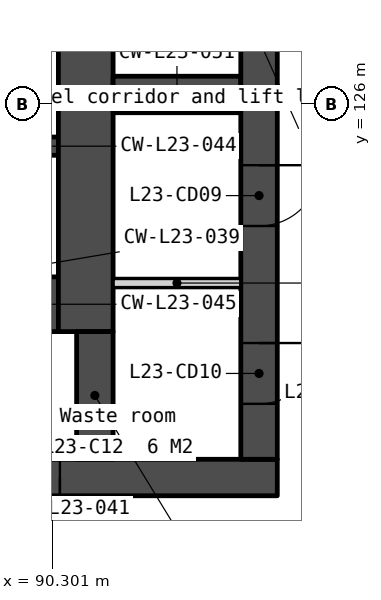
"""IFC4 building model, lengths in metres.
Left out: names, types, materials, properties, quantities, classifications, styles, units other than length and angle.
Written with IfcOpenShell. Run it as: python <this file> out.ifc"""

import sys

from ifc_helpers import new_model, si_unit, direction, frame, frame_2d, origin, place, context, subcontext, project, spatial, polyline, rectangle, outline, extrude, element, fill, save


model = new_model("IFC4")
c1 = context("Model", 3, precision=1e-05, world=origin(), true_north=direction((0.0, 1.0)))
c2 = subcontext(c1, "Body", "Model", "MODEL_VIEW")
j1 = project(units=[si_unit("LENGTHUNIT", "METRE"), si_unit("PLANEANGLEUNIT", "RADIAN")], contexts=[c1])
p1 = place(None, origin())
s1 = spatial("IfcSite", under=j1, at=p1, CompositionType="ELEMENT")
p2 = place(p1, origin())
s2 = spatial("IfcBuilding", under=s1, at=p2, CompositionType="ELEMENT")
p3 = place(p2, frame((0.0, 0.0, 95.8)))
s3 = spatial("IfcBuildingStorey", under=s2, at=p3, CompositionType="ELEMENT", Elevation=95.8)
p4 = place(p3, frame((66.0, 119.85, 0.0), z_axis=(0.0, 0.0, 1.0), x_axis=(1.0, 0.0, 0.0)))
e1 = element("IfcWall", 1, at=p4, inside=s3, PredefinedType="SOLIDWALL", context=c2, shape_type="SweptSolid", body=[
    extrude(rectangle(XDim=28.0, YDim=0.6, at=frame_2d((14.0, 0.0))), origin(), (0.0, 0.0, 1.0), 3.35),
])
p5 = place(p4, frame((6.825, 0.0, 0.0)))
e2 = element("IfcOpeningElement", 2, at=p5, cuts=e1, PredefinedType="OPENING", context=c2, shape_type="SweptSolid", body=[
    extrude(rectangle(XDim=1.8, YDim=2.1, at=frame_2d((0.9, 1.05))), frame((0.0, 0.31, 0.0), z_axis=(0.0, -1.0, 0.0), x_axis=(1.0, 0.0, 0.0)), (0.0, 0.0, 1.0), 0.62),
])
p6 = place(p4, frame((15.85, 0.0, 0.0)))
e3 = element("IfcOpeningElement", 3, at=p6, cuts=e1, PredefinedType="OPENING", context=c2, shape_type="SweptSolid", body=[
    extrude(rectangle(XDim=1.5, YDim=2.1, at=frame_2d((0.75, 1.05))), frame((0.0, 0.31, 0.0), z_axis=(0.0, -1.0, 0.0), x_axis=(1.0, 0.0, 0.0)), (0.0, 0.0, 1.0), 0.62),
])
p7 = place(p4, frame((19.375, 0.0, 0.0)))
e4 = element("IfcOpeningElement", 4, at=p7, cuts=e1, PredefinedType="OPENING", context=c2, shape_type="SweptSolid", body=[
    extrude(rectangle(XDim=1.8, YDim=2.1, at=frame_2d((0.9, 1.05))), frame((0.0, 0.31, 0.0), z_axis=(0.0, -1.0, 0.0), x_axis=(1.0, 0.0, 0.0)), (0.0, 0.0, 1.0), 0.62),
])
p8 = place(p4, frame((4.425, 0.0, 0.0)))
e5 = element("IfcOpeningElement", 5, at=p8, cuts=e1, PredefinedType="OPENING", context=c2, shape_type="SweptSolid", body=[
    extrude(rectangle(XDim=1.0, YDim=2.1, at=frame_2d((0.5, 1.05))), frame((0.0, 0.31, 0.0), z_axis=(0.0, -1.0, 0.0), x_axis=(1.0, 0.0, 0.0)), (0.0, 0.0, 1.0), 0.62),
])
p9 = place(p4, frame((9.925, 0.0, 0.0)))
e6 = element("IfcOpeningElement", 6, at=p9, cuts=e1, PredefinedType="OPENING", context=c2, shape_type="SweptSolid", body=[
    extrude(rectangle(XDim=1.0, YDim=2.1, at=frame_2d((0.5, 1.05))), frame((0.0, 0.31, 0.0), z_axis=(0.0, -1.0, 0.0), x_axis=(1.0, 0.0, 0.0)), (0.0, 0.0, 1.0), 0.62),
])
p10 = place(p4, frame((13.125, 0.0, 0.0)))
e7 = element("IfcOpeningElement", 7, at=p10, cuts=e1, PredefinedType="OPENING", context=c2, shape_type="SweptSolid", body=[
    extrude(rectangle(XDim=1.0, YDim=2.1, at=frame_2d((0.5, 1.05))), frame((0.0, 0.31, 0.0), z_axis=(0.0, -1.0, 0.0), x_axis=(1.0, 0.0, 0.0)), (0.0, 0.0, 1.0), 0.62),
])
p11 = place(p4, frame((21.725, 0.0, 0.0)))
e8 = element("IfcOpeningElement", 8, at=p11, cuts=e1, PredefinedType="OPENING", context=c2, shape_type="SweptSolid", body=[
    extrude(rectangle(XDim=1.0, YDim=2.1, at=frame_2d((0.5, 1.05))), frame((0.0, 0.31, 0.0), z_axis=(0.0, -1.0, 0.0), x_axis=(1.0, 0.0, 0.0)), (0.0, 0.0, 1.0), 0.62),
])
p12 = place(p4, frame((23.425, 0.0, 0.0)))
e9 = element("IfcOpeningElement", 9, at=p12, cuts=e1, PredefinedType="OPENING", context=c2, shape_type="SweptSolid", body=[
    extrude(rectangle(XDim=1.0, YDim=2.1, at=frame_2d((0.5, 1.05))), frame((0.0, 0.31, 0.0), z_axis=(0.0, -1.0, 0.0), x_axis=(1.0, 0.0, 0.0)), (0.0, 0.0, 1.0), 0.62),
])
p13 = place(p3, frame((87.85, 125.3, 0.0), z_axis=(0.0, 0.0, 1.0), x_axis=(1.0, 0.0, 0.0)))
e10 = element("IfcWall", 10, at=p13, inside=s3, PredefinedType="SOLIDWALL", context=c2, shape_type="SweptSolid", body=[
    extrude(rectangle(XDim=2.55, YDim=0.3, at=frame_2d((1.275, 0.0))), origin(), (0.0, 0.0, 1.0), 3.35),
])
p14 = place(p3, frame((87.85, 122.7, 0.0), z_axis=(0.0, 0.0, 1.0), x_axis=(1.0, 0.0, 0.0)))
e11 = element("IfcWall", 11, at=p14, inside=s3, PredefinedType="SOLIDWALL", context=c2, shape_type="SweptSolid", body=[
    extrude(rectangle(XDim=2.55, YDim=0.9, at=frame_2d((1.275, 0.0))), origin(), (0.0, 0.0, 1.0), 3.35),
])
p15 = place(p3, frame((90.85, 133.95, 0.0), z_axis=(0.0, 0.0, 1.0), x_axis=(0.0, -1.0, 0.0)))
e12 = element("IfcWall", 12, at=p15, inside=s3, PredefinedType="SOLIDWALL", context=c2, shape_type="SweptSolid", body=[
    extrude(rectangle(XDim=11.7, YDim=0.9, at=frame_2d((5.85, 0.0))), origin(), (0.0, 0.0, 1.0), 3.35),
])
p16 = place(p3, frame((91.0, 122.25, 0.0), z_axis=(0.0, 0.0, 1.0), x_axis=(0.0, -1.0, 0.0)))
e13 = element("IfcWall", 13, at=p16, inside=s3, PredefinedType="SOLIDWALL", context=c2, shape_type="SweptSolid", body=[
    extrude(rectangle(XDim=2.1, YDim=0.6, at=frame_2d((1.05, 0.0))), origin(), (0.0, 0.0, 1.0), 3.35),
])
p17 = place(p3, frame((91.3, 126.15, 0.0), z_axis=(0.0, 0.0, 1.0), x_axis=(1.0, 0.0, 0.0)))
e14 = element("IfcWall", 14, at=p17, inside=s3, PredefinedType="SOLIDWALL", context=c2, shape_type="SweptSolid", body=[
    extrude(rectangle(XDim=2.1, YDim=0.6, at=frame_2d((1.05, 0.0))), origin(), (0.0, 0.0, 1.0), 3.35),
])
p18 = place(p3, frame((91.3, 123.049, 0.0), z_axis=(0.0, 0.0, 1.0), x_axis=(1.0, 0.0, 0.0)))
e15 = element("IfcWall", 15, at=p18, inside=s3, PredefinedType="PARTITIONING", context=c2, shape_type="SweptSolid", body=[
    extrude(rectangle(XDim=2.1, YDim=0.15, at=frame_2d((1.05, 0.0))), origin(), (0.0, 0.0, 1.0), 3.35),
])
p19 = place(p3, frame((93.7, 133.95, 0.0), z_axis=(0.0, 0.0, 1.0), x_axis=(0.0, -1.0, 0.0)))
e16 = element("IfcWall", 16, at=p19, inside=s3, PredefinedType="SOLIDWALL", context=c2, shape_type="SweptSolid", body=[
    extrude(rectangle(XDim=13.8, YDim=0.6, at=frame_2d((6.9, 0.0))), origin(), (0.0, 0.0, 1.0), 3.35),
])
p20 = place(p19, frame((0.6, 0.0, 0.0)))
e17 = element("IfcOpeningElement", 17, at=p20, cuts=e16, PredefinedType="OPENING", context=c2, shape_type="SweptSolid", body=[
    extrude(rectangle(XDim=1.1, YDim=2.1, at=frame_2d((0.55, 1.05))), frame((0.0, 0.31, 0.0), z_axis=(0.0, -1.0, 0.0), x_axis=(1.0, 0.0, 0.0)), (0.0, 0.0, 1.0), 0.62),
])
p21 = place(p19, frame((8.963, 0.0, 0.0)))
e18 = element("IfcOpeningElement", 18, at=p21, cuts=e16, PredefinedType="OPENING", context=c2, shape_type="SweptSolid", body=[
    extrude(rectangle(XDim=1.0, YDim=2.1, at=frame_2d((0.5, 1.05))), frame((0.0, 0.31, 0.0), z_axis=(0.0, -1.0, 0.0), x_axis=(1.0, 0.0, 0.0)), (0.0, 0.0, 1.0), 0.62),
])
p22 = place(p19, frame((11.888, 0.0, 0.0)))
e19 = element("IfcOpeningElement", 19, at=p22, cuts=e16, PredefinedType="OPENING", context=c2, shape_type="SweptSolid", body=[
    extrude(rectangle(XDim=1.0, YDim=2.1, at=frame_2d((0.5, 1.05))), frame((0.0, 0.31, 0.0), z_axis=(0.0, -1.0, 0.0), x_axis=(1.0, 0.0, 0.0)), (0.0, 0.0, 1.0), 0.62),
])
p23 = place(p3, frame((82.605, 93.333, -0.15), z_axis=(0.0, 0.0, 1.0), x_axis=(0.500000478905, 0.866025127289, 0.0)))
e20 = element("IfcWall", 20, at=p23, inside=s3, PredefinedType="SOLIDWALL", context=c2, shape_type="SweptSolid", body=[
    extrude(outline(polyline([(42.643, 0.0), (42.643, 3.5), (0.0, 3.5), (0.0, 0.0), (42.643, 0.0)])), frame((0.0, 0.225, 0.0), z_axis=(0.0, -1.0, 0.0), x_axis=(1.0, 0.0, 0.0)), (0.0, 0.0, 1.0), 0.45),
])
p24 = place(p23, frame((2.814, 0.0, 1.05)))
e21 = element("IfcOpeningElement", 21, at=p24, cuts=e20, PredefinedType="OPENING", context=c2, shape_type="SweptSolid", body=[
    extrude(rectangle(XDim=1.2, YDim=1.5, at=frame_2d((0.6, 0.75))), frame((0.0, 0.235, 0.0), z_axis=(0.0, -1.0, 0.0), x_axis=(1.0, 0.0, 0.0)), (0.0, 0.0, 1.0), 0.47),
])
p25 = place(p23, frame((4.514, 0.0, 1.05)))
e22 = element("IfcOpeningElement", 22, at=p25, cuts=e20, PredefinedType="OPENING", context=c2, shape_type="SweptSolid", body=[
    extrude(rectangle(XDim=1.2, YDim=1.5, at=frame_2d((0.6, 0.75))), frame((0.0, 0.235, 0.0), z_axis=(0.0, -1.0, 0.0), x_axis=(1.0, 0.0, 0.0)), (0.0, 0.0, 1.0), 0.47),
])
p26 = place(p23, frame((11.343, 0.0, 1.05)))
e23 = element("IfcOpeningElement", 23, at=p26, cuts=e20, PredefinedType="OPENING", context=c2, shape_type="SweptSolid", body=[
    extrude(rectangle(XDim=1.2, YDim=1.5, at=frame_2d((0.6, 0.75))), frame((0.0, 0.235, 0.0), z_axis=(0.0, -1.0, 0.0), x_axis=(1.0, 0.0, 0.0)), (0.0, 0.0, 1.0), 0.47),
])
p27 = place(p23, frame((13.043, 0.0, 1.05)))
e24 = element("IfcOpeningElement", 24, at=p27, cuts=e20, PredefinedType="OPENING", context=c2, shape_type="SweptSolid", body=[
    extrude(rectangle(XDim=1.2, YDim=1.5, at=frame_2d((0.6, 0.75))), frame((0.0, 0.235, 0.0), z_axis=(0.0, -1.0, 0.0), x_axis=(1.0, 0.0, 0.0)), (0.0, 0.0, 1.0), 0.47),
])
p28 = place(p23, frame((19.872, 0.0, 1.05)))
e25 = element("IfcOpeningElement", 25, at=p28, cuts=e20, PredefinedType="OPENING", context=c2, shape_type="SweptSolid", body=[
    extrude(rectangle(XDim=1.2, YDim=1.5, at=frame_2d((0.6, 0.75))), frame((0.0, 0.235, 0.0), z_axis=(0.0, -1.0, 0.0), x_axis=(1.0, 0.0, 0.0)), (0.0, 0.0, 1.0), 0.47),
])
p29 = place(p23, frame((21.572, 0.0, 1.05)))
e26 = element("IfcOpeningElement", 26, at=p29, cuts=e20, PredefinedType="OPENING", context=c2, shape_type="SweptSolid", body=[
    extrude(rectangle(XDim=1.2, YDim=1.5, at=frame_2d((0.6, 0.75))), frame((0.0, 0.235, 0.0), z_axis=(0.0, -1.0, 0.0), x_axis=(1.0, 0.0, 0.0)), (0.0, 0.0, 1.0), 0.47),
])
p30 = place(p23, frame((28.4, 0.0, 1.05)))
e27 = element("IfcOpeningElement", 27, at=p30, cuts=e20, PredefinedType="OPENING", context=c2, shape_type="SweptSolid", body=[
    extrude(rectangle(XDim=1.2, YDim=1.5, at=frame_2d((0.6, 0.75))), frame((0.0, 0.235, 0.0), z_axis=(0.0, -1.0, 0.0), x_axis=(1.0, 0.0, 0.0)), (0.0, 0.0, 1.0), 0.47),
])
p31 = place(p23, frame((30.1, 0.0, 1.05)))
e28 = element("IfcOpeningElement", 28, at=p31, cuts=e20, PredefinedType="OPENING", context=c2, shape_type="SweptSolid", body=[
    extrude(rectangle(XDim=1.2, YDim=1.5, at=frame_2d((0.6, 0.75))), frame((0.0, 0.235, 0.0), z_axis=(0.0, -1.0, 0.0), x_axis=(1.0, 0.0, 0.0)), (0.0, 0.0, 1.0), 0.47),
])
p32 = place(p23, frame((36.929, 0.0, 1.05)))
e29 = element("IfcOpeningElement", 29, at=p32, cuts=e20, PredefinedType="OPENING", context=c2, shape_type="SweptSolid", body=[
    extrude(rectangle(XDim=1.2, YDim=1.5, at=frame_2d((0.6, 0.75))), frame((0.0, 0.235, 0.0), z_axis=(0.0, -1.0, 0.0), x_axis=(1.0, 0.0, 0.0)), (0.0, 0.0, 1.0), 0.47),
])
p33 = place(p23, frame((38.629, 0.0, 1.05)))
e30 = element("IfcOpeningElement", 30, at=p33, cuts=e20, PredefinedType="OPENING", context=c2, shape_type="SweptSolid", body=[
    extrude(rectangle(XDim=1.2, YDim=1.5, at=frame_2d((0.6, 0.75))), frame((0.0, 0.235, 0.0), z_axis=(0.0, -1.0, 0.0), x_axis=(1.0, 0.0, 0.0)), (0.0, 0.0, 1.0), 0.47),
])
p34 = place(p21, origin())
e31 = element("IfcDoor", 31, at=p34, inside=s3, OperationType="SINGLE_SWING_LEFT", PredefinedType="DOOR", context=c2, shape_type="SweptSolid", body=[
    extrude(rectangle(XDim=1.0, YDim=2.1, at=frame_2d((0.5, 1.05))), frame((0.0, 0.025, 0.0), z_axis=(0.0, -1.0, 0.0), x_axis=(1.0, 0.0, 0.0)), (0.0, 0.0, 1.0), 0.05),
])
fill(e18, e31)
p35 = place(p22, origin())
e32 = element("IfcDoor", 32, at=p35, inside=s3, OperationType="SINGLE_SWING_LEFT", PredefinedType="DOOR", context=c2, shape_type="SweptSolid", body=[
    extrude(rectangle(XDim=1.0, YDim=2.1, at=frame_2d((0.5, 1.05))), frame((0.0, 0.025, 0.0), z_axis=(0.0, -1.0, 0.0), x_axis=(1.0, 0.0, 0.0)), (0.0, 0.0, 1.0), 0.05),
])
fill(e19, e32)
p36 = place(p12, origin())
e33 = element("IfcDoor", 33, at=p36, inside=s3, OperationType="SINGLE_SWING_RIGHT", PredefinedType="DOOR", context=c2, shape_type="SweptSolid", body=[
    extrude(rectangle(XDim=1.0, YDim=2.1, at=frame_2d((0.5, 1.05))), frame((0.0, 0.025, 0.0), z_axis=(0.0, -1.0, 0.0), x_axis=(1.0, 0.0, 0.0)), (0.0, 0.0, 1.0), 0.05),
])
fill(e9, e33)
save(model, sys.argv[1])
